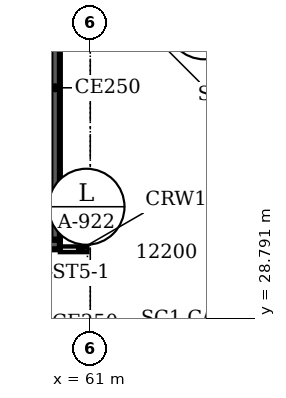
"""IFC4 building model, lengths in metres.
Left out: names, types, materials, properties, quantities, classifications, styles, units other than length and angle.
Written with IfcOpenShell. Run it as: python <this file> out.ifc"""

import sys

from ifc_helpers import new_model, si_unit, direction, frame, frame_2d, origin, place, context, subcontext, project, spatial, rectangle, extrude, source, transform, mapped, element, save


model = new_model("IFC4")
c1 = context("Model", 3, precision=1e-05, world=origin(), true_north=direction((0.0, 1.0)))
c2 = subcontext(c1, "Body", "Model", "MODEL_VIEW")
j1 = project(units=[si_unit("LENGTHUNIT", "METRE"), si_unit("PLANEANGLEUNIT", "RADIAN")], contexts=[c1])
p1 = place(None, origin())
s1 = spatial("IfcSite", under=j1, at=p1, CompositionType="ELEMENT")
p2 = place(p1, origin())
s2 = spatial("IfcBuilding", under=s1, at=p2, CompositionType="ELEMENT")
p3 = place(p2, frame((0.0, 0.0, -5.4)))
s3 = spatial("IfcBuildingStorey", under=s2, at=p3, CompositionType="ELEMENT", Elevation=-5.4)
p4 = place(p3, frame((60.2, 30.725, 0.0), z_axis=(0.0, 0.0, 1.0), x_axis=(-1.0, 0.0, 0.0)))
e1 = element("IfcWall", 1, at=p4, inside=s3, PredefinedType="SOLIDWALL", context=c2, shape_type="SweptSolid", body=[
    extrude(rectangle(XDim=3.9, YDim=0.25, at=frame_2d((1.95, 0.0))), origin(), (0.0, 0.0, 1.0), 5.4),
])
m1 = source(origin(), c2, "Body", "SweptSolid", [
    extrude(rectangle(XDim=1.2, YDim=2.1, at=frame_2d((0.6, 1.05))), frame((0.0, 0.135, 0.0), z_axis=(0.0, -1.0, 0.0), x_axis=(1.0, 0.0, 0.0)), (0.0, 0.0, 1.0), 0.27),
])
p5 = place(p4, frame((1.35, 0.0, 0.0)))
e2 = element("IfcOpeningElement", 2, at=p5, cuts=e1, PredefinedType="OPENING", context=c2, shape_type="MappedRepresentation", body=[
    mapped(m1, transform((0.0, 0.0, 0.0), scale=1.0)),
])
p6 = place(p3, frame((60.075, 38.85, 0.0), z_axis=(0.0, 0.0, 1.0), x_axis=(0.0, -1.0, 0.0)))
e3 = element("IfcWall", 3, at=p6, inside=s3, PredefinedType="SOLIDWALL", context=c2, shape_type="SweptSolid", body=[
    extrude(rectangle(XDim=8.0, YDim=0.25, at=frame_2d((4.0, 0.0))), origin(), (0.0, 0.0, 1.0), 5.4),
])
p7 = place(p3, frame((61.0, 29.8, 0.0), z_axis=(0.0, 0.0, 1.0), x_axis=(0.0, 1.0, 0.0)))
e4 = element("IfcWall", 4, at=p7, inside=s3, PredefinedType="PARTITIONING", context=c2, shape_type="SweptSolid", body=[
    extrude(rectangle(XDim=0.8, YDim=0.15, at=frame_2d((0.4, 0.0))), origin(), (0.0, 0.0, 1.0), 4.315),
])
p8 = place(p3, frame((60.2, 30.6, 0.0), z_axis=(0.0, 0.0, 1.0), x_axis=(1.0, 0.0, 0.0)))
e5 = element("IfcWall", 5, at=p8, inside=s3, PredefinedType="PARTITIONING", context=c2, shape_type="SweptSolid", body=[
    extrude(rectangle(XDim=0.724, YDim=0.15, at=frame_2d((0.362, 0.0))), origin(), (0.0, 0.0, 1.0), 4.315),
])
save(model, sys.argv[1])
